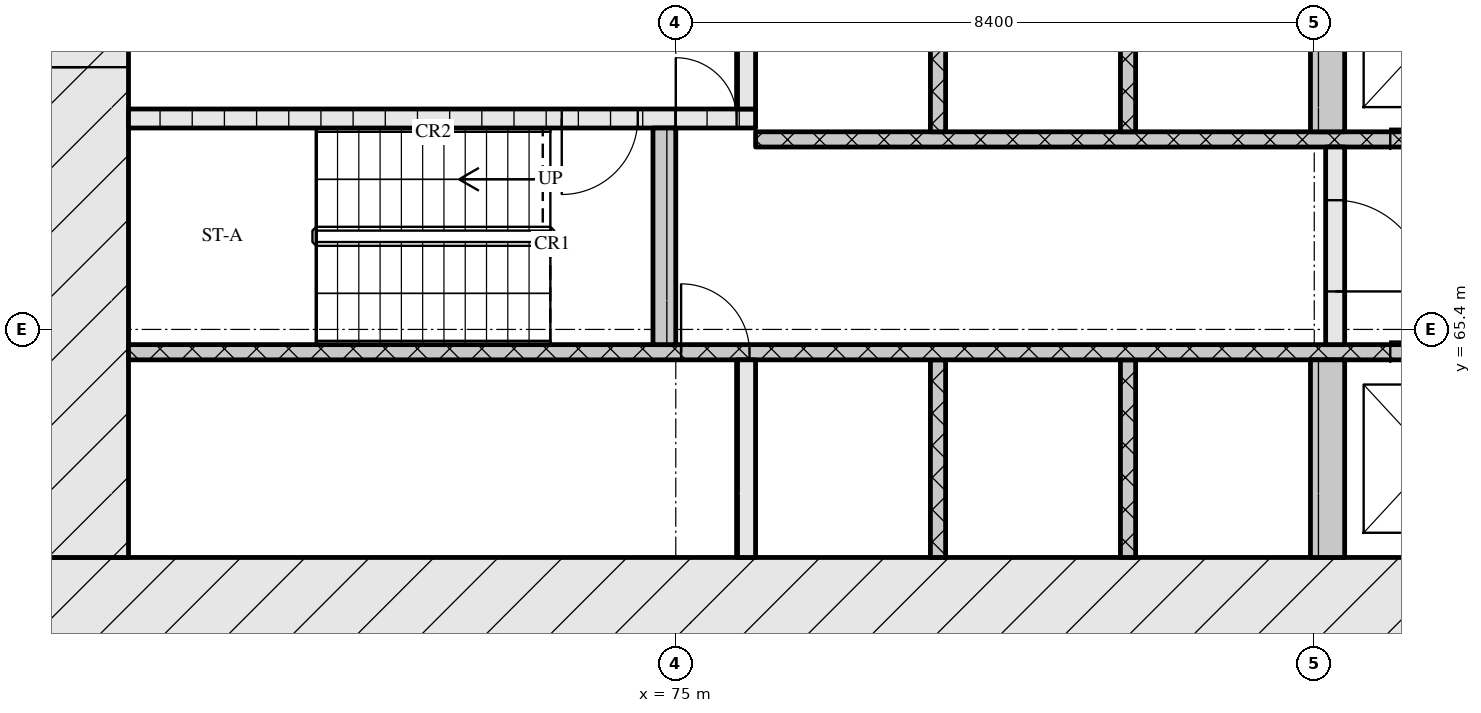
"""IFC4 building model, lengths in metres.
Left out: names, types, materials, properties, quantities, classifications, styles, units other than length and angle.
Written with IfcOpenShell. Run it as: python <this file> out.ifc"""

import sys

from ifc_helpers import new_model, si_unit, direction, frame, frame_2d, origin, place, context, subcontext, project, spatial, rectangle, extrude, element, fill, save


model = new_model("IFC4")
c1 = context("Model", 3, precision=1e-05, world=origin(), true_north=direction((0.0, 1.0)))
c2 = subcontext(c1, "Body", "Model", "MODEL_VIEW")
j1 = project(units=[si_unit("LENGTHUNIT", "METRE"), si_unit("PLANEANGLEUNIT", "RADIAN")], contexts=[c1])
p1 = place(None, origin())
s1 = spatial("IfcSite", under=j1, at=p1, CompositionType="ELEMENT")
p2 = place(p1, origin())
s2 = spatial("IfcBuilding", under=s1, at=p2, CompositionType="ELEMENT")
p3 = place(p2, frame((0.0, 0.0, 23.7)))
s3 = spatial("IfcBuildingStorey", under=s2, at=p3, CompositionType="ELEMENT", Elevation=23.7)
p4 = place(p3, frame((66.6, 61.8, 0.0), z_axis=(0.0, 0.0, 1.0), x_axis=(1.0, 0.0, 0.0)))
e1 = element("IfcWall", 1, at=p4, inside=s3, PredefinedType="SOLIDWALL", context=c2, shape_type="SweptSolid", body=[
    extrude(rectangle(XDim=42.0, YDim=1.2, at=frame_2d((21.0, 0.0))), origin(), (0.0, 0.0, 1.0), 4.2),
])
p5 = place(p4, frame((21.35, 0.0, 0.0)))
e2 = element("IfcOpeningElement", 2, at=p5, cuts=e1, PredefinedType="OPENING", context=c2, shape_type="SweptSolid", body=[
    extrude(rectangle(XDim=1.8, YDim=2.1, at=frame_2d((0.9, 1.05))), frame((0.0, 0.61, 0.0), z_axis=(0.0, -1.0, 0.0), x_axis=(1.0, 0.0, 0.0)), (0.0, 0.0, 1.0), 1.22),
])
p6 = place(p3, frame((67.2, 62.4, 0.0), z_axis=(0.0, 0.0, 1.0), x_axis=(0.0, 1.0, 0.0)))
e3 = element("IfcWall", 3, at=p6, inside=s3, PredefinedType="SOLIDWALL", context=c2, shape_type="SweptSolid", body=[
    extrude(rectangle(XDim=12.0, YDim=1.2, at=frame_2d((6.0, 0.0))), origin(), (0.0, 0.0, 1.0), 4.2),
])
p7 = place(p6, frame((6.45, 0.0, 0.0)))
e4 = element("IfcOpeningElement", 4, at=p7, cuts=e3, PredefinedType="OPENING", context=c2, shape_type="SweptSolid", body=[
    extrude(rectangle(XDim=1.2, YDim=2.1, at=frame_2d((0.6, 1.05))), frame((0.0, 0.61, 0.0), z_axis=(0.0, -1.0, 0.0), x_axis=(1.0, 0.0, 0.0)), (0.0, 0.0, 1.0), 1.22),
])
p8 = place(p3, frame((75.925, 62.4, 0.0), z_axis=(0.0, 0.0, 1.0), x_axis=(0.0, 1.0, 0.0)))
e5 = element("IfcWall", 5, at=p8, inside=s3, PredefinedType="SOLIDWALL", context=c2, shape_type="SweptSolid", body=[
    extrude(rectangle(XDim=2.6, YDim=0.25, at=frame_2d((1.3, 0.0))), origin(), (0.0, 0.0, 1.0), 4.2),
])
for number, where, z_axis, x_axis in (
    (6, (78.45, 62.4, 0.0), (0.0, 0.0, 1.0), (0.0, 1.0, 0.0)),
    (7, (80.95, 62.4, 0.0), (0.0, 0.0, 1.0), (0.0, 1.0, 0.0)),
):
    element("IfcWall", number, at=place(p3, frame(where, z_axis=z_axis, x_axis=x_axis)), inside=s3, PredefinedType="SOLIDWALL", context=c2, shape_type="SweptSolid", body=[
        extrude(rectangle(XDim=2.6, YDim=0.2, at=frame_2d((1.3, 0.0))), origin(), (0.0, 0.0, 1.0), 4.2),
    ])
p9 = place(p3, frame((83.575, 62.4, 0.0), z_axis=(0.0, 0.0, 1.0), x_axis=(0.0, 1.0, 0.0)))
e8 = element("IfcWall", 8, at=p9, inside=s3, PredefinedType="SOLIDWALL", context=c2, shape_type="SweptSolid", body=[
    extrude(rectangle(XDim=2.6, YDim=0.45, at=frame_2d((1.3, 0.0))), origin(), (0.0, 0.0, 1.0), 4.2),
])
p10 = place(p3, frame((67.8, 65.1, 0.0), z_axis=(0.0, 0.0, 1.0), x_axis=(1.0, 0.0, 0.0)))
e9 = element("IfcWall", 9, at=p10, inside=s3, PredefinedType="SOLIDWALL", context=c2, shape_type="SweptSolid", body=[
    extrude(rectangle(XDim=18.5, YDim=0.2, at=frame_2d((9.25, 0.0))), origin(), (0.0, 0.0, 1.0), 4.2),
])
p11 = place(p10, frame((7.27, 0.0, 0.0)))
e10 = element("IfcOpeningElement", 10, at=p11, cuts=e9, PredefinedType="OPENING", context=c2, shape_type="SweptSolid", body=[
    extrude(rectangle(XDim=0.9, YDim=2.1, at=frame_2d((0.45, 1.05))), frame((0.0, 0.11, 0.0), z_axis=(0.0, -1.0, 0.0), x_axis=(1.0, 0.0, 0.0)), (0.0, 0.0, 1.0), 0.22),
])
p12 = place(p10, frame((16.6, 0.0, 0.0)))
e11 = element("IfcOpeningElement", 11, at=p12, cuts=e9, PredefinedType="OPENING", context=c2, shape_type="SweptSolid", body=[
    extrude(rectangle(XDim=1.1, YDim=2.1, at=frame_2d((0.55, 1.05))), frame((0.0, 0.11, 0.0), z_axis=(0.0, -1.0, 0.0), x_axis=(1.0, 0.0, 0.0)), (0.0, 0.0, 1.0), 0.22),
])
p13 = place(p3, frame((74.85, 65.2, 0.0), z_axis=(0.0, 0.0, 1.0), x_axis=(0.0, 1.0, 0.0)))
e12 = element("IfcWall", 12, at=p13, inside=s3, PredefinedType="SOLIDWALL", context=c2, shape_type="SweptSolid", body=[
    extrude(rectangle(XDim=2.85, YDim=0.3, at=frame_2d((1.425, 0.0))), origin(), (0.0, 0.0, 1.0), 4.2),
])
p14 = place(p3, frame((83.675, 65.2, 0.0), z_axis=(0.0, 0.0, 1.0), x_axis=(0.0, 1.0, 0.0)))
e13 = element("IfcWall", 13, at=p14, inside=s3, PredefinedType="SOLIDWALL", context=c2, shape_type="SweptSolid", body=[
    extrude(rectangle(XDim=2.6, YDim=0.25, at=frame_2d((1.3, 0.0))), origin(), (0.0, 0.0, 1.0), 4.2),
])
p15 = place(p14, frame((0.7, 0.0, 0.0)))
e14 = element("IfcOpeningElement", 14, at=p15, cuts=e13, PredefinedType="OPENING", context=c2, shape_type="SweptSolid", body=[
    extrude(rectangle(XDim=1.2, YDim=2.1, at=frame_2d((0.6, 1.05))), frame((0.0, 0.135, 0.0), z_axis=(0.0, -1.0, 0.0), x_axis=(1.0, 0.0, 0.0)), (0.0, 0.0, 1.0), 0.27),
])
p16 = place(p3, frame((76.05, 67.9, 0.0), z_axis=(0.0, 0.0, 1.0), x_axis=(1.0, 0.0, 0.0)))
e15 = element("IfcWall", 15, at=p16, inside=s3, PredefinedType="SOLIDWALL", context=c2, shape_type="SweptSolid", body=[
    extrude(rectangle(XDim=23.1, YDim=0.2, at=frame_2d((11.55, 0.0))), origin(), (0.0, 0.0, 1.0), 4.2),
])
p17 = place(p16, frame((8.35, 0.0, 0.0)))
e16 = element("IfcOpeningElement", 16, at=p17, cuts=e15, PredefinedType="OPENING", context=c2, shape_type="SweptSolid", body=[
    extrude(rectangle(XDim=1.1, YDim=2.1, at=frame_2d((0.55, 1.05))), frame((0.0, 0.11, 0.0), z_axis=(0.0, -1.0, 0.0), x_axis=(1.0, 0.0, 0.0)), (0.0, 0.0, 1.0), 0.22),
])
p18 = place(p16, frame((10.85, 0.0, 0.0)))
e17 = element("IfcOpeningElement", 17, at=p18, cuts=e15, PredefinedType="OPENING", context=c2, shape_type="SweptSolid", body=[
    extrude(rectangle(XDim=1.1, YDim=2.1, at=frame_2d((0.55, 1.05))), frame((0.0, 0.11, 0.0), z_axis=(0.0, -1.0, 0.0), x_axis=(1.0, 0.0, 0.0)), (0.0, 0.0, 1.0), 0.22),
])
p19 = place(p16, frame((13.55, 0.0, 0.0)))
e18 = element("IfcOpeningElement", 18, at=p19, cuts=e15, PredefinedType="OPENING", context=c2, shape_type="SweptSolid", body=[
    extrude(rectangle(XDim=1.0, YDim=2.1, at=frame_2d((0.5, 1.05))), frame((0.0, 0.11, 0.0), z_axis=(0.0, -1.0, 0.0), x_axis=(1.0, 0.0, 0.0)), (0.0, 0.0, 1.0), 0.22),
])
for number, where, z_axis, x_axis in (
    (19, (78.45, 68.0, 0.0), (0.0, 0.0, 1.0), (0.0, 1.0, 0.0)),
    (20, (80.95, 68.0, 0.0), (0.0, 0.0, 1.0), (0.0, 1.0, 0.0)),
):
    element("IfcWall", number, at=place(p3, frame(where, z_axis=z_axis, x_axis=x_axis)), inside=s3, PredefinedType="SOLIDWALL", context=c2, shape_type="SweptSolid", body=[
        extrude(rectangle(XDim=2.6, YDim=0.2, at=frame_2d((1.3, 0.0))), origin(), (0.0, 0.0, 1.0), 4.2),
    ])
p20 = place(p3, frame((83.575, 68.0, 0.0), z_axis=(0.0, 0.0, 1.0), x_axis=(0.0, 1.0, 0.0)))
e21 = element("IfcWall", 21, at=p20, inside=s3, PredefinedType="SOLIDWALL", context=c2, shape_type="SweptSolid", body=[
    extrude(rectangle(XDim=2.6, YDim=0.45, at=frame_2d((1.3, 0.0))), origin(), (0.0, 0.0, 1.0), 4.2),
])
p21 = place(p3, frame((67.8, 68.175, 0.0), z_axis=(0.0, 0.0, 1.0), x_axis=(1.0, 0.0, 0.0)))
e22 = element("IfcWall", 22, at=p21, inside=s3, PredefinedType="SOLIDWALL", context=c2, shape_type="SweptSolid", body=[
    extrude(rectangle(XDim=8.25, YDim=0.25, at=frame_2d((4.125, 0.0))), origin(), (0.0, 0.0, 1.0), 4.2),
])
p22 = place(p21, frame((5.7, 0.0, 0.0)))
e23 = element("IfcOpeningElement", 23, at=p22, cuts=e22, PredefinedType="OPENING", context=c2, shape_type="SweptSolid", body=[
    extrude(rectangle(XDim=1.0, YDim=2.1, at=frame_2d((0.5, 1.05))), frame((0.0, 0.135, 0.0), z_axis=(0.0, -1.0, 0.0), x_axis=(1.0, 0.0, 0.0)), (0.0, 0.0, 1.0), 0.27),
])
p23 = place(p21, frame((7.2, 0.0, 0.0)))
e24 = element("IfcOpeningElement", 24, at=p23, cuts=e22, PredefinedType="OPENING", context=c2, shape_type="SweptSolid", body=[
    extrude(rectangle(XDim=0.8, YDim=2.1, at=frame_2d((0.4, 1.05))), frame((0.0, 0.135, 0.0), z_axis=(0.0, -1.0, 0.0), x_axis=(1.0, 0.0, 0.0)), (0.0, 0.0, 1.0), 0.27),
])
p24 = place(p3, frame((75.925, 68.3, 0.0), z_axis=(0.0, 0.0, 1.0), x_axis=(0.0, 1.0, 0.0)))
e25 = element("IfcWall", 25, at=p24, inside=s3, PredefinedType="SOLIDWALL", context=c2, shape_type="SweptSolid", body=[
    extrude(rectangle(XDim=2.3, YDim=0.25, at=frame_2d((1.15, 0.0))), origin(), (0.0, 0.0, 1.0), 4.2),
])
p25 = place(p11, origin())
e26 = element("IfcDoor", 26, at=p25, inside=s3, OperationType="SINGLE_SWING_LEFT", PredefinedType="DOOR", context=c2, shape_type="SweptSolid", body=[
    extrude(rectangle(XDim=0.9, YDim=2.1, at=frame_2d((0.45, 1.05))), frame((0.0, 0.025, 0.0), z_axis=(0.0, -1.0, 0.0), x_axis=(1.0, 0.0, 0.0)), (0.0, 0.0, 1.0), 0.05),
])
fill(e10, e26)
p26 = place(p12, origin())
e27 = element("IfcDoor", 27, at=p26, inside=s3, OperationType="SLIDING_TO_LEFT", PredefinedType="DOOR", context=c2, shape_type="SweptSolid", body=[
    extrude(rectangle(XDim=1.1, YDim=2.1, at=frame_2d((0.55, 1.05))), frame((0.0, 0.025, 0.0), z_axis=(0.0, -1.0, 0.0), x_axis=(1.0, 0.0, 0.0)), (0.0, 0.0, 1.0), 0.05),
])
fill(e11, e27)
p27 = place(p15, origin())
e28 = element("IfcDoor", 28, at=p27, inside=s3, OperationType="SINGLE_SWING_RIGHT", PredefinedType="DOOR", context=c2, shape_type="SweptSolid", body=[
    extrude(rectangle(XDim=1.2, YDim=2.1, at=frame_2d((0.6, 1.05))), frame((0.0, 0.025, 0.0), z_axis=(0.0, -1.0, 0.0), x_axis=(1.0, 0.0, 0.0)), (0.0, 0.0, 1.0), 0.05),
])
fill(e14, e28)
p28 = place(p17, origin())
e29 = element("IfcDoor", 29, at=p28, inside=s3, OperationType="SLIDING_TO_RIGHT", PredefinedType="DOOR", context=c2, shape_type="SweptSolid", body=[
    extrude(rectangle(XDim=1.1, YDim=2.1, at=frame_2d((0.55, 1.05))), frame((0.0, 0.025, 0.0), z_axis=(0.0, -1.0, 0.0), x_axis=(1.0, 0.0, 0.0)), (0.0, 0.0, 1.0), 0.05),
])
fill(e16, e29)
p29 = place(p22, origin())
e30 = element("IfcDoor", 30, at=p29, inside=s3, OperationType="SINGLE_SWING_RIGHT", PredefinedType="DOOR", context=c2, shape_type="SweptSolid", body=[
    extrude(rectangle(XDim=1.0, YDim=2.1, at=frame_2d((0.5, 1.05))), frame((0.0, 0.025, 0.0), z_axis=(0.0, -1.0, 0.0), x_axis=(1.0, 0.0, 0.0)), (0.0, 0.0, 1.0), 0.05),
])
fill(e23, e30)
p30 = place(p23, origin())
e31 = element("IfcDoor", 31, at=p30, inside=s3, OperationType="SINGLE_SWING_LEFT", PredefinedType="DOOR", context=c2, shape_type="SweptSolid", body=[
    extrude(rectangle(XDim=0.8, YDim=2.1, at=frame_2d((0.4, 1.05))), frame((0.0, 0.025, 0.0), z_axis=(0.0, -1.0, 0.0), x_axis=(1.0, 0.0, 0.0)), (0.0, 0.0, 1.0), 0.05),
])
fill(e24, e31)
p31 = place(p7, origin())
e32 = element("IfcDoor", 32, at=p31, inside=s3, OperationType="SINGLE_SWING_LEFT", PredefinedType="DOOR", context=c2, shape_type="SweptSolid", body=[
    extrude(rectangle(XDim=1.2, YDim=2.1, at=frame_2d((0.6, 1.05))), frame((0.0, 0.025, 0.0), z_axis=(0.0, -1.0, 0.0), x_axis=(1.0, 0.0, 0.0)), (0.0, 0.0, 1.0), 0.05),
])
fill(e4, e32)
save(model, sys.argv[1])
